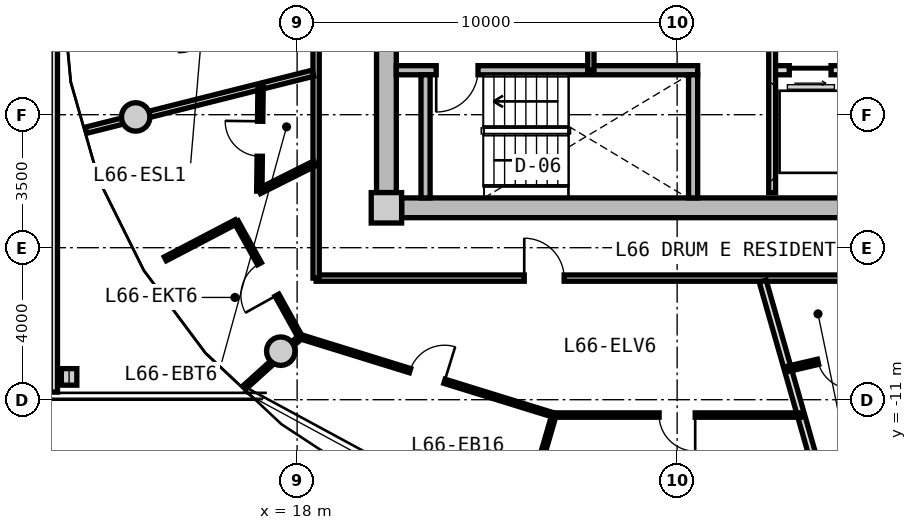
"""IFC4 building model, lengths in metres.
Left out: names, types, materials, properties, quantities, classifications, styles, units other than length and angle.
Written with IfcOpenShell. Run it as: python <this file> out.ifc"""

import sys

from ifc_helpers import new_model, si_unit, direction, frame, frame_2d, origin, origin_2d, place, context, subcontext, project, spatial, rectangle, circle, i_section, extrude, source, transform, mapped, element, fill, save


model = new_model("IFC4")
c1 = context("Model", 3, precision=1e-05, world=origin(), true_north=direction((0.0, 1.0)))
c2 = subcontext(c1, "Body", "Model", "MODEL_VIEW")
j1 = project(units=[si_unit("LENGTHUNIT", "METRE"), si_unit("PLANEANGLEUNIT", "RADIAN")], contexts=[c1])
p1 = place(None, origin())
s1 = spatial("IfcSite", under=j1, at=p1, CompositionType="ELEMENT")
p2 = place(p1, origin())
s2 = spatial("IfcBuilding", under=s1, at=p2, CompositionType="ELEMENT")
p3 = place(p2, frame((0.0, 0.0, 213.9)))
s3 = spatial("IfcBuildingStorey", under=s2, at=p3, CompositionType="ELEMENT", Elevation=213.9)
m1 = source(origin(), c2, "Body", "SweptSolid", [
    extrude(rectangle(XDim=0.8, YDim=0.8, at=origin_2d()), origin(), (0.0, 0.0, 1.0), 3.05),
])
p4 = place(p3, frame((20.35, -5.95, 0.0), z_axis=(0.0, 0.0, 1.0), x_axis=(1.0, 0.0, 0.0)))
e1 = element("IfcColumn", 1, at=p4, inside=s3, PredefinedType="COLUMN", context=c2, shape_type="MappedRepresentation", body=[
    mapped(m1, transform((0.0, 0.0, 0.0), x_axis=(1.0, 0.0, 0.0), y_axis=(0.0, 1.0, 0.0), z_axis=(0.0, 0.0, 1.0), scale=1.0)),
])
m2 = source(origin(), c2, "Body", "SweptSolid", [
    extrude(rectangle(XDim=14.5, YDim=0.52, at=frame_2d((7.25, 0.0))), origin(), (0.0, 0.0, 1.0), 2.76),
])
p5 = place(p3, frame((35.25, -5.95, 0.0), z_axis=(0.0, 0.0, 1.0), x_axis=(-1.0, 0.0, 0.0)))
e2 = element("IfcWall", 2, at=p5, inside=s3, PredefinedType="SHEAR", context=c2, shape_type="MappedRepresentation", body=[
    mapped(m2, transform((0.0, 0.0, 0.0), x_axis=(1.0, 0.0, 0.0), y_axis=(0.0, 1.0, 0.0), z_axis=(0.0, 0.0, 1.0), scale=1.0)),
])
m3 = source(origin(), c2, "Body", "SweptSolid", [
    extrude(rectangle(XDim=11.1, YDim=0.52, at=frame_2d((5.55, 0.0))), origin(), (0.0, 0.0, 1.0), 2.76),
])
p6 = place(p3, frame((20.35, -5.55, 0.0), z_axis=(0.0, 0.0, 1.0), x_axis=(0.0, 1.0, 0.0)))
e3 = element("IfcWall", 3, at=p6, inside=s3, PredefinedType="SHEAR", context=c2, shape_type="MappedRepresentation", body=[
    mapped(m3, transform((0.0, 0.0, 0.0), x_axis=(1.0, 0.0, 0.0), y_axis=(0.0, 1.0, 0.0), z_axis=(0.0, 0.0, 1.0), scale=1.0)),
])
p7 = place(p6, frame((3.8, 0.0, 0.0)))
e4 = element("IfcOpeningElement", 4, at=p7, cuts=e3, PredefinedType="OPENING", context=c2, shape_type="SweptSolid", body=[
    extrude(rectangle(XDim=1.2, YDim=2.15, at=frame_2d((0.6, 1.075))), frame((0.0, 0.27, 0.0), z_axis=(0.0, -1.0, 0.0), x_axis=(1.0, 0.0, 0.0)), (0.0, 0.0, 1.0), 0.54),
])
m4 = source(origin(), c2, "Body", "SweptSolid", [
    extrude(circle(Radius=0.375, at=origin_2d()), origin(), (0.0, 0.0, 1.0), 3.05),
])
for number, where, z_axis, x_axis in (
    (5, (13.753, -3.559, 0.0), (0.0, 0.0, 1.0), (1.0, 0.0, 0.0)),
    (6, (17.57, -9.723, 0.0), (0.0, 0.0, 1.0), (1.0, 0.0, 0.0)),
):
    element("IfcColumn", number, at=place(p3, frame(where, z_axis=z_axis, x_axis=x_axis)), inside=s3, PredefinedType="COLUMN", context=c2, shape_type="MappedRepresentation", body=[
        mapped(m4, transform((0.0, 0.0, 0.0), x_axis=(1.0, 0.0, 0.0), y_axis=(0.0, 1.0, 0.0), z_axis=(0.0, 0.0, 1.0), scale=1.0)),
    ])
m5 = source(origin(), c2, "Body", "SweptSolid", [
    extrude(i_section(OverallWidth=0.407, OverallDepth=0.435, WebThickness=0.024, FlangeThickness=0.039, FilletRadius=0.015, at=origin_2d()), origin(), (0.0, 0.0, 1.0), 3.05),
])
p8 = place(p3, frame((12.0, -10.4, 0.0), z_axis=(0.0, 0.0, 1.0), x_axis=(1.0, 0.0, 0.0)))
e7 = element("IfcColumn", 7, at=p8, inside=s3, PredefinedType="COLUMN", context=c2, shape_type="MappedRepresentation", body=[
    mapped(m5, transform((0.0, 0.0, 0.0), x_axis=(1.0, 0.0, 0.0), y_axis=(0.0, 1.0, 0.0), z_axis=(0.0, 0.0, 1.0), scale=1.0)),
])
m6 = source(origin(), c2, "Body", "SweptSolid", [
    extrude(rectangle(XDim=7.93, YDim=0.24, at=frame_2d((3.965, 0.0))), origin(), (0.0, 0.0, 1.0), 2.76),
])
p9 = place(p3, frame((20.61, -2.33, 0.0), z_axis=(0.0, 0.0, 1.0), x_axis=(1.0, 0.0, 0.0)))
e8 = element("IfcWall", 8, at=p9, inside=s3, PredefinedType="PARTITIONING", context=c2, shape_type="MappedRepresentation", body=[
    mapped(m6, transform((0.0, 0.0, 0.0), x_axis=(1.0, 0.0, 0.0), y_axis=(0.0, 1.0, 0.0), z_axis=(0.0, 0.0, 1.0), scale=1.0)),
])
p10 = place(p9, frame((1.05, 0.0, 0.0)))
e9 = element("IfcOpeningElement", 9, at=p10, cuts=e8, PredefinedType="OPENING", context=c2, shape_type="SweptSolid", body=[
    extrude(rectangle(XDim=1.1, YDim=2.15, at=frame_2d((0.55, 1.075))), frame((0.0, 0.13, 0.0), z_axis=(0.0, -1.0, 0.0), x_axis=(1.0, 0.0, 0.0)), (0.0, 0.0, 1.0), 0.26),
])
m7 = source(origin(), c2, "Body", "SweptSolid", [
    extrude(rectangle(XDim=3.24, YDim=0.24, at=frame_2d((1.62, 0.0))), origin(), (0.0, 0.0, 1.0), 2.76),
])
for number, where, z_axis, x_axis in (
    (10, (21.38, -5.69, 0.0), (0.0, 0.0, 1.0), (0.0, 1.0, 0.0)),
    (11, (28.42, -5.69, 0.0), (0.0, 0.0, 1.0), (0.0, 1.0, 0.0)),
):
    element("IfcWall", number, at=place(p3, frame(where, z_axis=z_axis, x_axis=x_axis)), inside=s3, PredefinedType="PARTITIONING", context=c2, shape_type="MappedRepresentation", body=[
        mapped(m7, transform((0.0, 0.0, 0.0), x_axis=(1.0, 0.0, 0.0), y_axis=(0.0, 1.0, 0.0), z_axis=(0.0, 0.0, 1.0), scale=1.0)),
    ])
m8 = source(origin(), c2, "Body", "SweptSolid", [
    extrude(rectangle(XDim=2.05, YDim=0.24, at=frame_2d((1.025, 0.0))), origin(), (0.0, 0.0, 1.0), 2.745),
])
p11 = place(p3, frame((30.5, -2.33, 0.0), z_axis=(0.0, 0.0, 1.0), x_axis=(1.0, 0.0, 0.0)))
e12 = element("IfcWall", 12, at=p11, inside=s3, PredefinedType="PARTITIONING", context=c2, shape_type="MappedRepresentation", body=[
    mapped(m8, transform((0.0, 0.0, 0.0), x_axis=(1.0, 0.0, 0.0), y_axis=(0.0, 1.0, 0.0), z_axis=(0.0, 0.0, 1.0), scale=1.0)),
])
p12 = place(p11, frame((0.45, 0.0, 0.0)))
e13 = element("IfcOpeningElement", 13, at=p12, cuts=e12, PredefinedType="OPENING", context=c2, shape_type="SweptSolid", body=[
    extrude(rectangle(XDim=1.1, YDim=2.2, at=frame_2d((0.55, 1.1))), frame((0.0, 0.13, 0.0), z_axis=(0.0, -1.0, 0.0), x_axis=(1.0, 0.0, 0.0)), (0.0, 0.0, 1.0), 0.26),
])
m9 = source(origin(), c2, "Body", "SweptSolid", [
    extrude(rectangle(XDim=4.2, YDim=0.18, at=frame_2d((2.1, 0.0))), origin(), (0.0, 0.0, 1.0), 2.745),
])
p13 = place(p3, frame((30.5, -5.55, 0.0), z_axis=(0.0, 0.0, 1.0), x_axis=(0.0, 1.0, 0.0)))
e14 = element("IfcWall", 14, at=p13, inside=s3, PredefinedType="PARTITIONING", context=c2, shape_type="MappedRepresentation", body=[
    mapped(m9, transform((0.0, 0.0, 0.0), x_axis=(1.0, 0.0, 0.0), y_axis=(0.0, 1.0, 0.0), z_axis=(0.0, 0.0, 1.0), scale=1.0)),
])
m10 = source(origin(), c2, "Body", "SweptSolid", [
    extrude(rectangle(XDim=0.98, YDim=0.165, at=frame_2d((0.49, 0.0))), origin(), (0.0, 0.0, 1.0), 2.745),
])
p14 = place(p3, frame((25.73, -2.33, 0.0), z_axis=(0.0, 0.0, 1.0), x_axis=(0.0, 1.0, 0.0)))
e15 = element("IfcWall", 15, at=p14, inside=s3, PredefinedType="PARTITIONING", context=c2, shape_type="MappedRepresentation", body=[
    mapped(m10, transform((0.0, 0.0, 0.0), x_axis=(1.0, 0.0, 0.0), y_axis=(0.0, 1.0, 0.0), z_axis=(0.0, 0.0, 1.0), scale=1.0)),
])
m11 = source(origin(), c2, "Body", "SweptSolid", [
    extrude(rectangle(XDim=19.0, YDim=0.165, at=frame_2d((9.5, 0.0))), origin(), (0.0, 0.0, 1.0), 2.745),
])
p15 = place(p3, frame((37.5, -7.8, 0.0), z_axis=(0.0, 0.0, 1.0), x_axis=(-1.0, 0.0, 0.0)))
e16 = element("IfcWall", 16, at=p15, inside=s3, PredefinedType="PARTITIONING", context=c2, shape_type="MappedRepresentation", body=[
    mapped(m11, transform((0.0, 0.0, 0.0), x_axis=(1.0, 0.0, 0.0), y_axis=(0.0, 1.0, 0.0), z_axis=(0.0, 0.0, 1.0), scale=1.0)),
])
p16 = place(p15, frame((12.473, 0.0, 0.0)))
e17 = element("IfcOpeningElement", 17, at=p16, cuts=e16, PredefinedType="OPENING", context=c2, shape_type="SweptSolid", body=[
    extrude(rectangle(XDim=1.05, YDim=2.15, at=frame_2d((0.525, 1.075))), frame((0.0, 0.093, 0.0), z_axis=(0.0, -1.0, 0.0), x_axis=(1.0, 0.0, 0.0)), (0.0, 0.0, 1.0), 0.185),
])
m12 = source(origin(), c2, "Body", "SweptSolid", [
    extrude(rectangle(XDim=6.88, YDim=0.165, at=frame_2d((3.44, 0.0))), origin(), (0.0, 0.0, 1.0), 2.745),
])
p17 = place(p3, frame((18.5, -7.8, 0.0), z_axis=(0.0, 0.0, 1.0), x_axis=(0.0, 1.0, 0.0)))
e18 = element("IfcWall", 18, at=p17, inside=s3, PredefinedType="PARTITIONING", context=c2, shape_type="MappedRepresentation", body=[
    mapped(m12, transform((0.0, 0.0, 0.0), x_axis=(1.0, 0.0, 0.0), y_axis=(0.0, 1.0, 0.0), z_axis=(0.0, 0.0, 1.0), scale=1.0)),
])
m13 = source(origin(), c2, "Body", "SweptSolid", [
    extrude(rectangle(XDim=6.157, YDim=0.165, at=frame_2d((3.079, 0.0))), origin(), (0.0, 0.0, 1.0), 2.345),
])
p18 = place(p3, frame((18.42, -2.407, 0.0), z_axis=(0.0, 0.0, 1.0), x_axis=(-0.969840867184, -0.243738984038, 0.0)))
e19 = element("IfcWall", 19, at=p18, inside=s3, PredefinedType="PARTITIONING", context=c2, shape_type="MappedRepresentation", body=[
    mapped(m13, transform((0.0, 0.0, 0.0), x_axis=(1.0, 0.0, 0.0), y_axis=(0.0, 1.0, 0.0), z_axis=(0.0, 0.0, 1.0), scale=1.0)),
])
m14 = source(origin(), c2, "Body", "SweptSolid", [
    extrude(rectangle(XDim=6.974, YDim=0.19, at=frame_2d((3.487, 0.0))), origin(), (0.0, 0.0, 1.0), 2.345),
])
p19 = place(p3, frame((30.251, -7.88, 0.0), z_axis=(0.0, 0.0, 1.0), x_axis=(0.274707256801, -0.961527910703, 0.0)))
e20 = element("IfcWall", 20, at=p19, inside=s3, PredefinedType="PARTITIONING", context=c2, shape_type="MappedRepresentation", body=[
    mapped(m14, transform((0.0, 0.0, 0.0), x_axis=(1.0, 0.0, 0.0), y_axis=(0.0, 1.0, 0.0), z_axis=(0.0, 0.0, 1.0), scale=1.0)),
])
m15 = source(origin(), c2, "Body", "SweptSolid", [
    extrude(rectangle(XDim=6.98, YDim=0.115, at=frame_2d((3.49, 0.0))), origin(), (0.0, 0.0, 1.0), 2.745),
])
p20 = place(p3, frame((18.091, -9.344, 0.0), z_axis=(0.0, 0.0, 1.0), x_axis=(0.955342331637, -0.295501318749, 0.0)))
e21 = element("IfcWall", 21, at=p20, inside=s3, PredefinedType="PARTITIONING", context=c2, shape_type="MappedRepresentation", body=[
    mapped(m15, transform((0.0, 0.0, 0.0), x_axis=(1.0, 0.0, 0.0), y_axis=(0.0, 1.0, 0.0), z_axis=(0.0, 0.0, 1.0), scale=1.0)),
])
p21 = place(p20, frame((3.015, 0.0, 0.0)))
e22 = element("IfcOpeningElement", 22, at=p21, cuts=e21, PredefinedType="OPENING", context=c2, shape_type="SweptSolid", body=[
    extrude(rectangle(XDim=0.95, YDim=2.1, at=frame_2d((0.475, 1.05))), frame((0.0, 0.067, 0.0), z_axis=(0.0, -1.0, 0.0), x_axis=(1.0, 0.0, 0.0)), (0.0, 0.0, 1.0), 0.135),
])
m16 = source(origin(), c2, "Body", "SweptSolid", [
    extrude(rectangle(XDim=1.988, YDim=0.115, at=frame_2d((0.994, 0.0))), origin(), (0.0, 0.0, 1.0), 2.345),
])
p22 = place(p3, frame((18.091, -9.344, 0.0), z_axis=(0.0, 0.0, 1.0), x_axis=(-0.741992301729, -0.670408401033, 0.0)))
e23 = element("IfcWall", 23, at=p22, inside=s3, PredefinedType="PARTITIONING", context=c2, shape_type="MappedRepresentation", body=[
    mapped(m16, transform((0.0, 0.0, 0.0), x_axis=(1.0, 0.0, 0.0), y_axis=(0.0, 1.0, 0.0), z_axis=(0.0, 0.0, 1.0), scale=1.0)),
])
m17 = source(origin(), c2, "Body", "SweptSolid", [
    extrude(rectangle(XDim=6.481, YDim=0.115, at=frame_2d((3.24, 0.0))), origin(), (0.0, 0.0, 1.0), 2.745),
])
p23 = place(p3, frame((24.76, -11.404, 0.0), z_axis=(0.0, 0.0, 1.0), x_axis=(1.0, 0.0, 0.0)))
e24 = element("IfcWall", 24, at=p23, inside=s3, PredefinedType="PARTITIONING", context=c2, shape_type="MappedRepresentation", body=[
    mapped(m17, transform((0.0, 0.0, 0.0), x_axis=(1.0, 0.0, 0.0), y_axis=(0.0, 1.0, 0.0), z_axis=(0.0, 0.0, 1.0), scale=1.0)),
])
p24 = place(p23, frame((2.765, 0.0, 0.0)))
e25 = element("IfcOpeningElement", 25, at=p24, cuts=e24, PredefinedType="OPENING", context=c2, shape_type="SweptSolid", body=[
    extrude(rectangle(XDim=0.95, YDim=2.1, at=frame_2d((0.475, 1.05))), frame((0.0, 0.067, 0.0), z_axis=(0.0, -1.0, 0.0), x_axis=(1.0, 0.0, 0.0)), (0.0, 0.0, 1.0), 0.135),
])
m18 = source(origin(), c2, "Body", "SweptSolid", [
    extrude(rectangle(XDim=3.313, YDim=0.115, at=frame_2d((1.657, 0.0))), origin(), (0.0, 0.0, 1.0), 2.345),
])
p25 = place(p3, frame((24.76, -11.404, 0.0), z_axis=(0.0, 0.0, 1.0), x_axis=(-0.279612365916, -0.960112975033, 0.0)))
e26 = element("IfcWall", 26, at=p25, inside=s3, PredefinedType="PARTITIONING", context=c2, shape_type="MappedRepresentation", body=[
    mapped(m18, transform((0.0, 0.0, 0.0), x_axis=(1.0, 0.0, 0.0), y_axis=(0.0, 1.0, 0.0), z_axis=(0.0, 0.0, 1.0), scale=1.0)),
])
m19 = source(origin(), c2, "Body", "SweptSolid", [
    extrude(rectangle(XDim=1.638, YDim=0.14, at=frame_2d((0.819, 0.0))), origin(), (0.0, 0.0, 1.0), 2.745),
])
p26 = place(p3, frame((18.47, -4.778, 0.0), z_axis=(0.0, 0.0, 1.0), x_axis=(-0.893919977945, -0.448226586707, 0.0)))
e27 = element("IfcWall", 27, at=p26, inside=s3, PredefinedType="PARTITIONING", context=c2, shape_type="MappedRepresentation", body=[
    mapped(m19, transform((0.0, 0.0, 0.0), x_axis=(1.0, 0.0, 0.0), y_axis=(0.0, 1.0, 0.0), z_axis=(0.0, 0.0, 1.0), scale=1.0)),
])
m20 = source(origin(), c2, "Body", "SweptSolid", [
    extrude(rectangle(XDim=2.759, YDim=0.14, at=frame_2d((1.379, 0.0))), origin(), (0.0, 0.0, 1.0), 2.745),
])
p27 = place(p3, frame((17.005, -5.513, 0.0), z_axis=(0.0, 0.0, 1.0), x_axis=(0.01194710728, 0.999928630767, 0.0)))
e28 = element("IfcWall", 28, at=p27, inside=s3, PredefinedType="PARTITIONING", context=c2, shape_type="MappedRepresentation", body=[
    mapped(m20, transform((0.0, 0.0, 0.0), x_axis=(1.0, 0.0, 0.0), y_axis=(0.0, 1.0, 0.0), z_axis=(0.0, 0.0, 1.0), scale=1.0)),
])
p28 = place(p27, frame((0.919, 0.0, 0.0)))
e29 = element("IfcOpeningElement", 29, at=p28, cuts=e28, PredefinedType="OPENING", context=c2, shape_type="SweptSolid", body=[
    extrude(rectangle(XDim=0.92, YDim=2.1, at=frame_2d((0.46, 1.05))), frame((0.0, 0.08, 0.0), z_axis=(0.0, -1.0, 0.0), x_axis=(1.0, 0.0, 0.0)), (0.0, 0.0, 1.0), 0.16),
])
m21 = source(origin(), c2, "Body", "SweptSolid", [
    extrude(rectangle(XDim=2.104, YDim=0.115, at=frame_2d((1.052, 0.0))), origin(), (0.0, 0.0, 1.0), 2.745),
])
p29 = place(p3, frame((16.396, -6.317, 0.0), z_axis=(0.0, 0.0, 1.0), x_axis=(-0.886060817493, -0.463569010724, 0.0)))
e30 = element("IfcWall", 30, at=p29, inside=s3, PredefinedType="PARTITIONING", context=c2, shape_type="MappedRepresentation", body=[
    mapped(m21, transform((0.0, 0.0, 0.0), x_axis=(1.0, 0.0, 0.0), y_axis=(0.0, 1.0, 0.0), z_axis=(0.0, 0.0, 1.0), scale=1.0)),
])
m22 = source(origin(), c2, "Body", "SweptSolid", [
    extrude(rectangle(XDim=3.472, YDim=0.115, at=frame_2d((1.736, 0.0))), origin(), (0.0, 0.0, 1.0), 2.745),
])
p30 = place(p3, frame((16.396, -6.317, 0.0), z_axis=(0.0, 0.0, 1.0), x_axis=(0.485804139346, -0.874067696574, 0.0)))
e31 = element("IfcWall", 31, at=p30, inside=s3, PredefinedType="PARTITIONING", context=c2, shape_type="MappedRepresentation", body=[
    mapped(m22, transform((0.0, 0.0, 0.0), x_axis=(1.0, 0.0, 0.0), y_axis=(0.0, 1.0, 0.0), z_axis=(0.0, 0.0, 1.0), scale=1.0)),
])
p31 = place(p30, frame((1.261, 0.0, 0.0)))
e32 = element("IfcOpeningElement", 32, at=p31, cuts=e31, PredefinedType="OPENING", context=c2, shape_type="SweptSolid", body=[
    extrude(rectangle(XDim=0.95, YDim=2.1, at=frame_2d((0.475, 1.05))), frame((0.0, 0.067, 0.0), z_axis=(0.0, -1.0, 0.0), x_axis=(1.0, 0.0, 0.0)), (0.0, 0.0, 1.0), 0.135),
])
m23 = source(origin(), c2, "Body", "SweptSolid", [
    extrude(rectangle(XDim=2.586, YDim=0.14, at=frame_2d((1.293, 0.0))), origin(), (0.0, 0.0, 1.0), 2.745),
])
p32 = place(p3, frame((33.415, -9.603, 0.0), z_axis=(0.0, 0.0, 1.0), x_axis=(-0.973691298219, -0.227871138526, 0.0)))
e33 = element("IfcWall", 33, at=p32, inside=s3, PredefinedType="PARTITIONING", context=c2, shape_type="MappedRepresentation", body=[
    mapped(m23, transform((0.0, 0.0, 0.0), x_axis=(1.0, 0.0, 0.0), y_axis=(0.0, 1.0, 0.0), z_axis=(0.0, 0.0, 1.0), scale=1.0)),
])
p33 = place(p32, frame((0.833, 0.0, 0.0)))
e34 = element("IfcOpeningElement", 34, at=p33, cuts=e33, PredefinedType="OPENING", context=c2, shape_type="SweptSolid", body=[
    extrude(rectangle(XDim=0.92, YDim=2.1, at=frame_2d((0.46, 1.05))), frame((0.0, 0.08, 0.0), z_axis=(0.0, -1.0, 0.0), x_axis=(1.0, 0.0, 0.0)), (0.0, 0.0, 1.0), 0.16),
])
m24 = source(origin(), c2, "Body", "SweptSolid", [
    extrude(rectangle(XDim=9.88, YDim=0.19, at=frame_2d((4.94, 0.0))), origin(), (0.0, 0.0, 1.0), 2.745),
])
p34 = place(p3, frame((11.6, -10.8, 0.0), z_axis=(0.0, 0.0, 1.0), x_axis=(0.0, 1.0, 0.0)))
e35 = element("IfcWall", 35, at=p34, inside=s3, PredefinedType="PARTITIONING", context=c2, shape_type="MappedRepresentation", body=[
    mapped(m24, transform((0.0, 0.0, 0.0), x_axis=(1.0, 0.0, 0.0), y_axis=(0.0, 1.0, 0.0), z_axis=(0.0, 0.0, 1.0), scale=1.0)),
])
m25 = source(origin(), c2, "Body", "SweptSolid", [
    extrude(rectangle(XDim=1.1, YDim=2.15, at=frame_2d((0.55, 1.075))), frame((0.0, 0.025, 0.0), z_axis=(0.0, -1.0, 0.0), x_axis=(1.0, 0.0, 0.0)), (0.0, 0.0, 1.0), 0.05),
])
p35 = place(p10, frame((1.1, 0.0, 0.0), z_axis=(0.0, 0.0, 1.0), x_axis=(-1.0, 0.0, 0.0)))
e36 = element("IfcDoor", 36, at=p35, inside=s3, OperationType="SINGLE_SWING_RIGHT", PredefinedType="DOOR", context=c2, shape_type="MappedRepresentation", body=[
    mapped(m25, transform((0.0, 0.0, 0.0), x_axis=(1.0, 0.0, 0.0), y_axis=(0.0, 1.0, 0.0), z_axis=(0.0, 0.0, 1.0), scale=1.0)),
])
fill(e9, e36)
m26 = source(origin(), c2, "Body", "SweptSolid", [
    extrude(rectangle(XDim=1.1, YDim=2.2, at=frame_2d((0.55, 1.1))), frame((0.0, 0.025, 0.0), z_axis=(0.0, -1.0, 0.0), x_axis=(1.0, 0.0, 0.0)), (0.0, 0.0, 1.0), 0.05),
])
p36 = place(p12, frame((1.1, 0.0, 0.0), z_axis=(0.0, 0.0, 1.0), x_axis=(-1.0, 0.0, 0.0)))
e37 = element("IfcDoor", 37, at=p36, inside=s3, OperationType="SLIDING_TO_RIGHT", PredefinedType="DOOR", context=c2, shape_type="MappedRepresentation", body=[
    mapped(m26, transform((0.0, 0.0, 0.0), x_axis=(1.0, 0.0, 0.0), y_axis=(0.0, 1.0, 0.0), z_axis=(0.0, 0.0, 1.0), scale=1.0)),
])
fill(e13, e37)
m27 = source(origin(), c2, "Body", "SweptSolid", [
    extrude(rectangle(XDim=1.05, YDim=2.15, at=frame_2d((0.525, 1.075))), frame((0.0, 0.025, 0.0), z_axis=(0.0, -1.0, 0.0), x_axis=(1.0, 0.0, 0.0)), (0.0, 0.0, 1.0), 0.05),
])
p37 = place(p16, frame((1.05, 0.0, 0.0), z_axis=(0.0, 0.0, 1.0), x_axis=(-1.0, 0.0, 0.0)))
e38 = element("IfcDoor", 38, at=p37, inside=s3, OperationType="SINGLE_SWING_LEFT", PredefinedType="DOOR", context=c2, shape_type="MappedRepresentation", body=[
    mapped(m27, transform((0.0, 0.0, 0.0), x_axis=(1.0, 0.0, 0.0), y_axis=(0.0, 1.0, 0.0), z_axis=(0.0, 0.0, 1.0), scale=1.0)),
])
fill(e17, e38)
m28 = source(origin(), c2, "Body", "SweptSolid", [
    extrude(rectangle(XDim=0.92, YDim=2.1, at=frame_2d((0.46, 1.05))), frame((0.0, 0.025, 0.0), z_axis=(0.0, -1.0, 0.0), x_axis=(1.0, 0.0, 0.0)), (0.0, 0.0, 1.0), 0.05),
])
p38 = place(p28, origin())
e39 = element("IfcDoor", 39, at=p38, inside=s3, OperationType="SINGLE_SWING_RIGHT", PredefinedType="DOOR", context=c2, shape_type="MappedRepresentation", body=[
    mapped(m28, transform((0.0, 0.0, 0.0), x_axis=(1.0, 0.0, 0.0), y_axis=(0.0, 1.0, 0.0), z_axis=(0.0, 0.0, 1.0), scale=1.0)),
])
fill(e29, e39)
m29 = source(origin(), c2, "Body", "SweptSolid", [
    extrude(rectangle(XDim=0.95, YDim=2.1, at=frame_2d((0.475, 1.05))), frame((0.0, 0.025, 0.0), z_axis=(0.0, -1.0, 0.0), x_axis=(1.0, 0.0, 0.0)), (0.0, 0.0, 1.0), 0.05),
])
p39 = place(p31, frame((0.95, 0.0, 0.0), z_axis=(0.0, 0.0, 1.0), x_axis=(-1.0, 0.0, 0.0)))
e40 = element("IfcDoor", 40, at=p39, inside=s3, OperationType="SINGLE_SWING_LEFT", PredefinedType="DOOR", context=c2, shape_type="MappedRepresentation", body=[
    mapped(m29, transform((0.0, 0.0, 0.0), x_axis=(1.0, 0.0, 0.0), y_axis=(0.0, 1.0, 0.0), z_axis=(0.0, 0.0, 1.0), scale=1.0)),
])
fill(e32, e40)
p40 = place(p21, origin())
e41 = element("IfcDoor", 41, at=p40, inside=s3, OperationType="SINGLE_SWING_RIGHT", PredefinedType="DOOR", context=c2, shape_type="MappedRepresentation", body=[
    mapped(m29, transform((0.0, 0.0, 0.0), x_axis=(1.0, 0.0, 0.0), y_axis=(0.0, 1.0, 0.0), z_axis=(0.0, 0.0, 1.0), scale=1.0)),
])
fill(e22, e41)
p41 = place(p24, frame((0.95, 0.0, 0.0), z_axis=(0.0, 0.0, 1.0), x_axis=(-1.0, 0.0, 0.0)))
e42 = element("IfcDoor", 42, at=p41, inside=s3, OperationType="SINGLE_SWING_LEFT", PredefinedType="DOOR", context=c2, shape_type="MappedRepresentation", body=[
    mapped(m29, transform((0.0, 0.0, 0.0), x_axis=(1.0, 0.0, 0.0), y_axis=(0.0, 1.0, 0.0), z_axis=(0.0, 0.0, 1.0), scale=1.0)),
])
fill(e25, e42)
p42 = place(p33, origin())
e43 = element("IfcDoor", 43, at=p42, inside=s3, OperationType="SINGLE_SWING_LEFT", PredefinedType="DOOR", context=c2, shape_type="MappedRepresentation", body=[
    mapped(m28, transform((0.0, 0.0, 0.0), x_axis=(1.0, 0.0, 0.0), y_axis=(0.0, 1.0, 0.0), z_axis=(0.0, 0.0, 1.0), scale=1.0)),
])
fill(e34, e43)
save(model, sys.argv[1])
